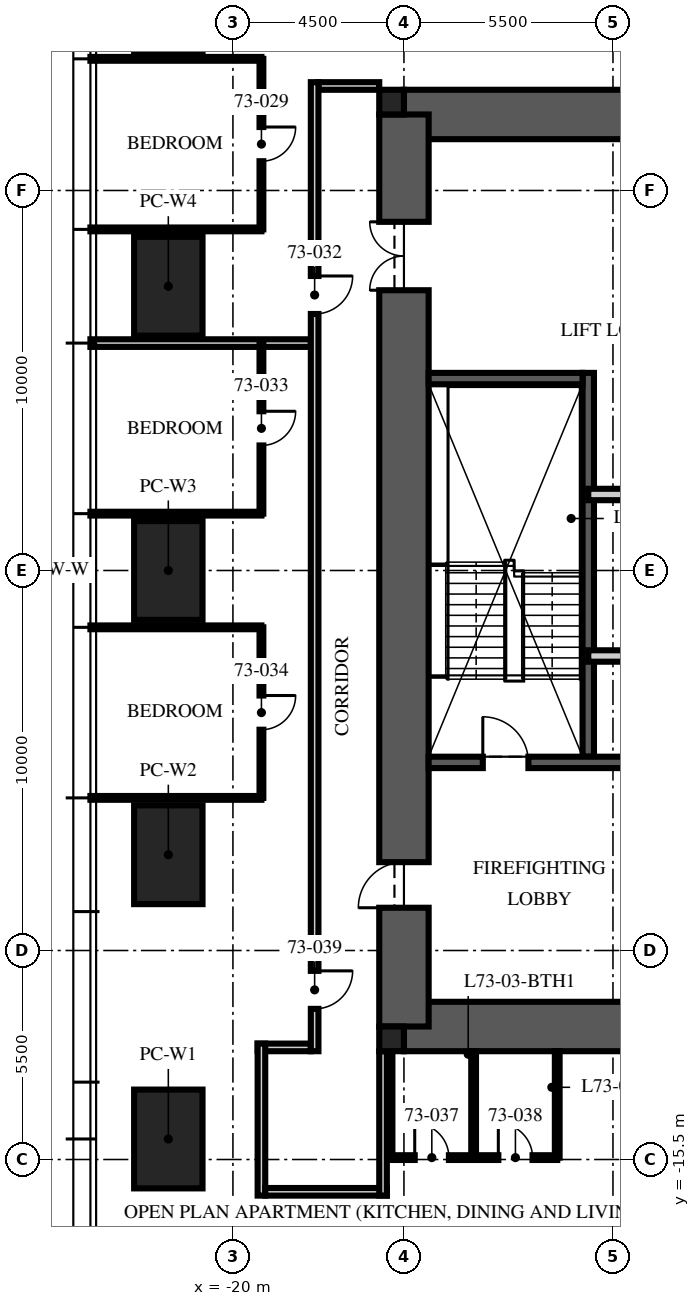
"""IFC4 building model, lengths in metres.
Left out: names, types, materials, properties, quantities, classifications, styles, units other than length and angle.
Written with IfcOpenShell. Run it as: python <this file> out.ifc"""

import sys

from ifc_helpers import new_model, si_unit, direction, frame, frame_2d, origin, origin_2d, place, context, subcontext, project, spatial, rectangle, extrude, element, fill, save


model = new_model("IFC4")
c1 = context("Model", 3, precision=1e-05, world=origin(), true_north=direction((0.0, 1.0)))
c2 = subcontext(c1, "Body", "Model", "MODEL_VIEW")
j1 = project(units=[si_unit("LENGTHUNIT", "METRE"), si_unit("PLANEANGLEUNIT", "RADIAN")], contexts=[c1])
p1 = place(None, origin())
s1 = spatial("IfcSite", under=j1, at=p1, CompositionType="ELEMENT")
p2 = place(p1, origin())
s2 = spatial("IfcBuilding", under=s1, at=p2, CompositionType="ELEMENT")
p3 = place(p2, frame((0.0, 0.0, 293.25)))
s3 = spatial("IfcBuildingStorey", under=s2, at=p3, CompositionType="ELEMENT", Elevation=293.25)
for number, where, z_axis, x_axis in (
    (1, (-15.5, 12.0, -0.25), (0.0, 0.0, 1.0), (1.0, 0.0, 0.0)),
    (2, (-15.5, -12.0, -0.25), (0.0, 0.0, 1.0), (1.0, 0.0, 0.0)),
):
    element("IfcWall", number, at=place(p3, frame(where, z_axis=z_axis, x_axis=x_axis)), inside=s3, PredefinedType="SHEAR", context=c2, shape_type="SweptSolid", body=[
        extrude(rectangle(XDim=31.0, YDim=1.3, at=frame_2d((15.5, 0.0))), origin(), (0.0, 0.0, 1.0), 3.75),
    ])
p4 = place(p3, frame((-15.5, -12.0, -0.25), z_axis=(0.0, 0.0, 1.0), x_axis=(0.0, 1.0, 0.0)))
e3 = element("IfcWall", 3, at=p4, inside=s3, PredefinedType="SHEAR", context=c2, shape_type="SweptSolid", body=[
    extrude(rectangle(XDim=24.0, YDim=1.3, at=frame_2d((12.0, 0.0))), origin(), (0.0, 0.0, 1.0), 3.75),
])
p5 = place(p4, frame((3.125, 0.0, 0.25)))
e4 = element("IfcOpeningElement", 4, at=p5, cuts=e3, PredefinedType="OPENING", context=c2, shape_type="SweptSolid", body=[
    extrude(rectangle(XDim=1.2, YDim=2.1, at=frame_2d((0.6, 1.05))), frame((0.0, 0.66, 0.0), z_axis=(0.0, -1.0, 0.0), x_axis=(1.0, 0.0, 0.0)), (0.0, 0.0, 1.0), 1.32),
])
p6 = place(p4, frame((19.375, 0.0, 0.25)))
e5 = element("IfcOpeningElement", 5, at=p6, cuts=e3, PredefinedType="OPENING", context=c2, shape_type="SweptSolid", body=[
    extrude(rectangle(XDim=1.8, YDim=2.1, at=frame_2d((0.9, 1.05))), frame((0.0, 0.66, 0.0), z_axis=(0.0, -1.0, 0.0), x_axis=(1.0, 0.0, 0.0)), (0.0, 0.0, 1.0), 1.32),
])
for number, where, z_axis, x_axis in (
    (6, (-15.825, 12.325, -0.25), (0.0, 0.0, 1.0), (1.0, 0.0, 0.0)),
    (7, (-15.825, -12.325, -0.25), (0.0, 0.0, 1.0), (1.0, 0.0, 0.0)),
):
    element("IfcColumn", number, at=place(p3, frame(where, z_axis=z_axis, x_axis=x_axis)), inside=s3, PredefinedType="COLUMN", context=c2, shape_type="SweptSolid", body=[
        extrude(rectangle(XDim=0.65, YDim=0.65, at=origin_2d()), origin(), (0.0, 0.0, 1.0), 3.75),
    ])
for number, where, z_axis, x_axis in (
    (8, (-21.7, -14.96, 0.0), (0.0, 0.0, 1.0), (0.0, 1.0, 0.0)),
    (9, (-21.7, -7.48, 0.0), (0.0, 0.0, 1.0), (0.0, 1.0, 0.0)),
    (10, (-21.7, 0.0, 0.0), (0.0, 0.0, 1.0), (0.0, 1.0, 0.0)),
    (11, (-21.7, 7.48, 0.0), (0.0, 0.0, 1.0), (0.0, 1.0, 0.0)),
):
    element("IfcColumn", number, at=place(p3, frame(where, z_axis=z_axis, x_axis=x_axis)), inside=s3, PredefinedType="COLUMN", context=c2, shape_type="SweptSolid", body=[
        extrude(rectangle(XDim=2.6, YDim=1.8, at=origin_2d()), origin(), (0.0, 0.0, 1.0), 3.75),
    ])
p7 = place(p3, frame((-10.65, -4.9, 0.0), z_axis=(0.0, 0.0, 1.0), x_axis=(0.0, 1.0, 0.0)))
e12 = element("IfcWall", 12, at=p7, inside=s3, PredefinedType="SOLIDWALL", context=c2, shape_type="SweptSolid", body=[
    extrude(rectangle(XDim=10.1, YDim=0.3, at=frame_2d((5.05, 0.0))), origin(), (0.0, 0.0, 1.0), 3.5),
])
p8 = place(p3, frame((-14.85, -5.05, 0.0), z_axis=(0.0, 0.0, 1.0), x_axis=(1.0, 0.0, 0.0)))
e13 = element("IfcWall", 13, at=p8, inside=s3, PredefinedType="SOLIDWALL", context=c2, shape_type="SweptSolid", body=[
    extrude(rectangle(XDim=6.05, YDim=0.3, at=frame_2d((3.025, 0.0))), origin(), (0.0, 0.0, 1.0), 3.5),
])
p9 = place(p8, frame((1.425, 0.0, 0.0)))
e14 = element("IfcOpeningElement", 14, at=p9, cuts=e13, PredefinedType="OPENING", context=c2, shape_type="SweptSolid", body=[
    extrude(rectangle(XDim=1.2, YDim=2.1, at=frame_2d((0.6, 1.05))), frame((0.0, 0.16, 0.0), z_axis=(0.0, -1.0, 0.0), x_axis=(1.0, 0.0, 0.0)), (0.0, 0.0, 1.0), 0.32),
])
p10 = place(p3, frame((-14.85, 5.05, 0.0), z_axis=(0.0, 0.0, 1.0), x_axis=(1.0, 0.0, 0.0)))
e15 = element("IfcWall", 15, at=p10, inside=s3, PredefinedType="SOLIDWALL", context=c2, shape_type="SweptSolid", body=[
    extrude(rectangle(XDim=4.05, YDim=0.3, at=frame_2d((2.025, 0.0))), origin(), (0.0, 0.0, 1.0), 3.5),
])
p11 = place(p3, frame((-10.65, 2.0, 0.0), z_axis=(0.0, 0.0, 1.0), x_axis=(1.0, 0.0, 0.0)))
e16 = element("IfcWall", 16, at=p11, inside=s3, PredefinedType="PARTITIONING", context=c2, shape_type="SweptSolid", body=[
    extrude(rectangle(XDim=21.3, YDim=0.3, at=frame_2d((10.65, 0.0))), origin(), (0.0, 0.0, 1.0), 3.5),
])
p12 = place(p11, frame((10.05, 0.0, 0.0)))
e17 = element("IfcOpeningElement", 17, at=p12, cuts=e16, PredefinedType="OPENING", context=c2, shape_type="SweptSolid", body=[
    extrude(rectangle(XDim=1.2, YDim=2.1, at=frame_2d((0.6, 1.05))), frame((0.0, 0.16, 0.0), z_axis=(0.0, -1.0, 0.0), x_axis=(1.0, 0.0, 0.0)), (0.0, 0.0, 1.0), 0.32),
])
p13 = place(p11, frame((18.942, 0.0, 0.0)))
e18 = element("IfcOpeningElement", 18, at=p13, cuts=e16, PredefinedType="OPENING", context=c2, shape_type="SweptSolid", body=[
    extrude(rectangle(XDim=0.9, YDim=2.1, at=frame_2d((0.45, 1.05))), frame((0.0, 0.16, 0.0), z_axis=(0.0, -1.0, 0.0), x_axis=(1.0, 0.0, 0.0)), (0.0, 0.0, 1.0), 0.32),
])
p14 = place(p3, frame((-10.65, -2.25, 0.0), z_axis=(0.0, 0.0, 1.0), x_axis=(1.0, 0.0, 0.0)))
e19 = element("IfcWall", 19, at=p14, inside=s3, PredefinedType="PARTITIONING", context=c2, shape_type="SweptSolid", body=[
    extrude(rectangle(XDim=7.35, YDim=0.3, at=frame_2d((3.675, 0.0))), origin(), (0.0, 0.0, 1.0), 3.5),
])
p15 = place(p3, frame((-17.95, -12.55, 0.0), z_axis=(0.0, 0.0, 1.0), x_axis=(-1.0, 0.0, 0.0)))
e20 = element("IfcWall", 20, at=p15, inside=s3, PredefinedType="PARTITIONING", context=c2, shape_type="SweptSolid", body=[
    extrude(rectangle(XDim=1.4, YDim=0.2, at=frame_2d((0.7, 0.0))), origin(), (0.0, 0.0, 1.0), 3.5),
])
p16 = place(p3, frame((-19.25, -12.45, 0.0), z_axis=(0.0, 0.0, 1.0), x_axis=(0.0, -1.0, 0.0)))
e21 = element("IfcWall", 21, at=p16, inside=s3, PredefinedType="PARTITIONING", context=c2, shape_type="SweptSolid", body=[
    extrude(rectangle(XDim=4.0, YDim=0.2, at=frame_2d((2.0, 0.0))), origin(), (0.0, 0.0, 1.0), 2.9),
])
p17 = place(p3, frame((-19.15, -16.35, 0.0), z_axis=(0.0, 0.0, 1.0), x_axis=(1.0, 0.0, 0.0)))
e22 = element("IfcWall", 22, at=p17, inside=s3, PredefinedType="PARTITIONING", context=c2, shape_type="SweptSolid", body=[
    extrude(rectangle(XDim=3.2, YDim=0.2, at=frame_2d((1.6, 0.0))), origin(), (0.0, 0.0, 1.0), 2.6),
])
p18 = place(p3, frame((-16.05, -16.45, 0.0), z_axis=(0.0, 0.0, 1.0), x_axis=(0.0, 1.0, 0.0)))
e23 = element("IfcWall", 23, at=p18, inside=s3, PredefinedType="PARTITIONING", context=c2, shape_type="SweptSolid", body=[
    extrude(rectangle(XDim=3.8, YDim=0.2, at=frame_2d((1.9, 0.0))), origin(), (0.0, 0.0, 1.0), 2.6),
])
p19 = place(p3, frame((-16.15, 12.75, 0.0), z_axis=(0.0, 0.0, 1.0), x_axis=(-1.0, 0.0, 0.0)))
e24 = element("IfcWall", 24, at=p19, inside=s3, PredefinedType="PARTITIONING", context=c2, shape_type="SweptSolid", body=[
    extrude(rectangle(XDim=1.6, YDim=0.2, at=frame_2d((0.8, 0.0))), origin(), (0.0, 0.0, 1.0), 2.6),
])
for number, where, z_axis, x_axis in (
    (25, (-19.25, 13.464, 0.0), (0.0, 0.0, 1.0), (-1.0, 0.0, 0.0)),
    (26, (-19.25, 8.976, 0.0), (0.0, 0.0, 1.0), (-1.0, 0.0, 0.0)),
):
    element("IfcWall", number, at=place(p3, frame(where, z_axis=z_axis, x_axis=x_axis)), inside=s3, PredefinedType="PARTITIONING", context=c2, shape_type="SweptSolid", body=[
        extrude(rectangle(XDim=4.5, YDim=0.1, at=frame_2d((2.25, 0.0))), origin(), (0.0, 0.0, 1.0), 3.01),
    ])
p20 = place(p3, frame((-17.95, 5.984, 0.0), z_axis=(0.0, 0.0, 1.0), x_axis=(-1.0, 0.0, 0.0)))
e27 = element("IfcWall", 27, at=p20, inside=s3, PredefinedType="PARTITIONING", context=c2, shape_type="SweptSolid", body=[
    extrude(rectangle(XDim=5.8, YDim=0.2, at=frame_2d((2.9, 0.0))), origin(), (0.0, 0.0, 1.0), 3.01),
])
for number, where, z_axis, x_axis in (
    (28, (-19.25, 1.496, 0.0), (0.0, 0.0, 1.0), (-1.0, 0.0, 0.0)),
    (29, (-19.25, -1.496, 0.0), (0.0, 0.0, 1.0), (-1.0, 0.0, 0.0)),
    (30, (-19.25, -5.984, 0.0), (0.0, 0.0, 1.0), (-1.0, 0.0, 0.0)),
):
    element("IfcWall", number, at=place(p3, frame(where, z_axis=z_axis, x_axis=x_axis)), inside=s3, PredefinedType="PARTITIONING", context=c2, shape_type="SweptSolid", body=[
        extrude(rectangle(XDim=4.5, YDim=0.1, at=frame_2d((2.25, 0.0))), origin(), (0.0, 0.0, 1.0), 3.01),
    ])
p21 = place(p3, frame((-19.25, 13.464, 0.0), z_axis=(0.0, 0.0, 1.0), x_axis=(0.0, -1.0, 0.0)))
e31 = element("IfcWall", 31, at=p21, inside=s3, PredefinedType="PARTITIONING", context=c2, shape_type="SweptSolid", body=[
    extrude(rectangle(XDim=4.488, YDim=0.1, at=frame_2d((2.244, 0.0))), origin(), (0.0, 0.0, 1.0), 2.91),
])
p22 = place(p21, frame((1.794, 0.0, 0.0)))
e32 = element("IfcOpeningElement", 32, at=p22, cuts=e31, PredefinedType="OPENING", context=c2, shape_type="SweptSolid", body=[
    extrude(rectangle(XDim=0.9, YDim=2.1, at=frame_2d((0.45, 1.05))), frame((0.0, 0.06, 0.0), z_axis=(0.0, -1.0, 0.0), x_axis=(1.0, 0.0, 0.0)), (0.0, 0.0, 1.0), 0.12),
])
p23 = place(p3, frame((-19.25, 5.984, 0.0), z_axis=(0.0, 0.0, 1.0), x_axis=(0.0, -1.0, 0.0)))
e33 = element("IfcWall", 33, at=p23, inside=s3, PredefinedType="PARTITIONING", context=c2, shape_type="SweptSolid", body=[
    extrude(rectangle(XDim=4.488, YDim=0.1, at=frame_2d((2.244, 0.0))), origin(), (0.0, 0.0, 1.0), 2.91),
])
p24 = place(p23, frame((1.794, 0.0, 0.0)))
e34 = element("IfcOpeningElement", 34, at=p24, cuts=e33, PredefinedType="OPENING", context=c2, shape_type="SweptSolid", body=[
    extrude(rectangle(XDim=0.9, YDim=2.1, at=frame_2d((0.45, 1.05))), frame((0.0, 0.06, 0.0), z_axis=(0.0, -1.0, 0.0), x_axis=(1.0, 0.0, 0.0)), (0.0, 0.0, 1.0), 0.12),
])
p25 = place(p3, frame((-19.25, -1.496, 0.0), z_axis=(0.0, 0.0, 1.0), x_axis=(0.0, -1.0, 0.0)))
e35 = element("IfcWall", 35, at=p25, inside=s3, PredefinedType="PARTITIONING", context=c2, shape_type="SweptSolid", body=[
    extrude(rectangle(XDim=4.488, YDim=0.1, at=frame_2d((2.244, 0.0))), origin(), (0.0, 0.0, 1.0), 2.91),
])
p26 = place(p25, frame((1.794, 0.0, 0.0)))
e36 = element("IfcOpeningElement", 36, at=p26, cuts=e35, PredefinedType="OPENING", context=c2, shape_type="SweptSolid", body=[
    extrude(rectangle(XDim=0.9, YDim=2.1, at=frame_2d((0.45, 1.05))), frame((0.0, 0.06, 0.0), z_axis=(0.0, -1.0, 0.0), x_axis=(1.0, 0.0, 0.0)), (0.0, 0.0, 1.0), 0.12),
])
p27 = place(p3, frame((-15.866, -15.45, 0.0), z_axis=(0.0, 0.0, 1.0), x_axis=(1.0, 0.0, 0.0)))
e37 = element("IfcWall", 37, at=p27, inside=s3, PredefinedType="PARTITIONING", context=c2, shape_type="SweptSolid", body=[
    extrude(rectangle(XDim=4.4, YDim=0.125, at=frame_2d((2.2, 0.0))), origin(), (0.0, 0.0, 1.0), 2.9),
])
p28 = place(p27, frame((0.65, 0.0, 0.0)))
e38 = element("IfcOpeningElement", 38, at=p28, cuts=e37, PredefinedType="OPENING", context=c2, shape_type="SweptSolid", body=[
    extrude(rectangle(XDim=0.9, YDim=2.1, at=frame_2d((0.45, 1.05))), frame((0.0, 0.073, 0.0), z_axis=(0.0, -1.0, 0.0), x_axis=(1.0, 0.0, 0.0)), (0.0, 0.0, 1.0), 0.145),
])
p29 = place(p27, frame((2.85, 0.0, 0.0)))
e39 = element("IfcOpeningElement", 39, at=p29, cuts=e37, PredefinedType="OPENING", context=c2, shape_type="SweptSolid", body=[
    extrude(rectangle(XDim=0.9, YDim=2.1, at=frame_2d((0.45, 1.05))), frame((0.0, 0.073, 0.0), z_axis=(0.0, -1.0, 0.0), x_axis=(1.0, 0.0, 0.0)), (0.0, 0.0, 1.0), 0.145),
])
p30 = place(p3, frame((-15.866, -12.65, 0.0), z_axis=(0.0, 0.0, 1.0), x_axis=(0.0, -1.0, 0.0)))
e40 = element("IfcWall", 40, at=p30, inside=s3, PredefinedType="PARTITIONING", context=c2, shape_type="SweptSolid", body=[
    extrude(rectangle(XDim=2.8, YDim=0.125, at=frame_2d((1.4, 0.0))), origin(), (0.0, 0.0, 1.0), 2.6),
])
for number, where, z_axis, x_axis in (
    (41, (-13.667, -12.65, 0.0), (0.0, 0.0, 1.0), (0.0, -1.0, 0.0)),
    (42, (-11.467, -12.65, 0.0), (0.0, 0.0, 1.0), (0.0, -1.0, 0.0)),
):
    element("IfcWall", number, at=place(p3, frame(where, z_axis=z_axis, x_axis=x_axis)), inside=s3, PredefinedType="PARTITIONING", context=c2, shape_type="SweptSolid", body=[
        extrude(rectangle(XDim=2.8, YDim=0.125, at=frame_2d((1.4, 0.0))), origin(), (0.0, 0.0, 1.0), 3.5),
    ])
p31 = place(p3, frame((-17.85, 12.85, 0.0), z_axis=(0.0, 0.0, 1.0), x_axis=(0.0, -1.0, 0.0)))
e43 = element("IfcWall", 43, at=p31, inside=s3, PredefinedType="PARTITIONING", context=c2, shape_type="SweptSolid", body=[
    extrude(rectangle(XDim=25.5, YDim=0.2, at=frame_2d((12.75, 0.0))), origin(), (0.0, 0.0, 1.0), 2.9),
])
p32 = place(p31, frame((5.1, 0.0, 0.0)))
e44 = element("IfcOpeningElement", 44, at=p32, cuts=e43, PredefinedType="OPENING", context=c2, shape_type="SweptSolid", body=[
    extrude(rectangle(XDim=1.0, YDim=2.2, at=frame_2d((0.5, 1.1))), frame((0.0, 0.11, 0.0), z_axis=(0.0, -1.0, 0.0), x_axis=(1.0, 0.0, 0.0)), (0.0, 0.0, 1.0), 0.22),
])
p33 = place(p31, frame((23.386, 0.0, 0.0)))
e45 = element("IfcOpeningElement", 45, at=p33, cuts=e43, PredefinedType="OPENING", context=c2, shape_type="SweptSolid", body=[
    extrude(rectangle(XDim=1.0, YDim=2.2, at=frame_2d((0.5, 1.1))), frame((0.0, 0.11, 0.0), z_axis=(0.0, -1.0, 0.0), x_axis=(1.0, 0.0, 0.0)), (0.0, 0.0, 1.0), 0.22),
])
p34 = place(p9, origin())
e46 = element("IfcDoor", 46, at=p34, inside=s3, OperationType="SINGLE_SWING_LEFT", PredefinedType="DOOR", context=c2, shape_type="SweptSolid", body=[
    extrude(rectangle(XDim=1.2, YDim=2.1, at=frame_2d((0.6, 1.05))), frame((0.0, 0.025, 0.0), z_axis=(0.0, -1.0, 0.0), x_axis=(1.0, 0.0, 0.0)), (0.0, 0.0, 1.0), 0.05),
])
fill(e14, e46)
p35 = place(p5, origin())
e47 = element("IfcDoor", 47, at=p35, inside=s3, OperationType="SINGLE_SWING_LEFT", PredefinedType="DOOR", context=c2, shape_type="SweptSolid", body=[
    extrude(rectangle(XDim=1.2, YDim=2.1, at=frame_2d((0.6, 1.05))), frame((0.0, 0.025, 0.0), z_axis=(0.0, -1.0, 0.0), x_axis=(1.0, 0.0, 0.0)), (0.0, 0.0, 1.0), 0.05),
])
fill(e4, e47)
p36 = place(p6, origin())
e48 = element("IfcDoor", 48, at=p36, inside=s3, OperationType="DOUBLE_DOOR_SINGLE_SWING", PredefinedType="DOOR", context=c2, shape_type="SweptSolid", body=[
    extrude(rectangle(XDim=1.8, YDim=2.1, at=frame_2d((0.9, 1.05))), frame((0.0, 0.025, 0.0), z_axis=(0.0, -1.0, 0.0), x_axis=(1.0, 0.0, 0.0)), (0.0, 0.0, 1.0), 0.05),
])
fill(e5, e48)
p37 = place(p22, origin())
e49 = element("IfcDoor", 49, at=p37, inside=s3, OperationType="SINGLE_SWING_LEFT", PredefinedType="DOOR", context=c2, shape_type="SweptSolid", body=[
    extrude(rectangle(XDim=0.9, YDim=2.1, at=frame_2d((0.45, 1.05))), frame((0.0, 0.025, 0.0), z_axis=(0.0, -1.0, 0.0), x_axis=(1.0, 0.0, 0.0)), (0.0, 0.0, 1.0), 0.05),
])
fill(e32, e49)
p38 = place(p32, origin())
e50 = element("IfcDoor", 50, at=p38, inside=s3, OperationType="SINGLE_SWING_LEFT", PredefinedType="DOOR", context=c2, shape_type="SweptSolid", body=[
    extrude(rectangle(XDim=1.0, YDim=2.2, at=frame_2d((0.5, 1.1))), frame((0.0, 0.025, 0.0), z_axis=(0.0, -1.0, 0.0), x_axis=(1.0, 0.0, 0.0)), (0.0, 0.0, 1.0), 0.05),
])
fill(e44, e50)
p39 = place(p24, origin())
e51 = element("IfcDoor", 51, at=p39, inside=s3, OperationType="SINGLE_SWING_LEFT", PredefinedType="DOOR", context=c2, shape_type="SweptSolid", body=[
    extrude(rectangle(XDim=0.9, YDim=2.1, at=frame_2d((0.45, 1.05))), frame((0.0, 0.025, 0.0), z_axis=(0.0, -1.0, 0.0), x_axis=(1.0, 0.0, 0.0)), (0.0, 0.0, 1.0), 0.05),
])
fill(e34, e51)
p40 = place(p26, origin())
e52 = element("IfcDoor", 52, at=p40, inside=s3, OperationType="SINGLE_SWING_LEFT", PredefinedType="DOOR", context=c2, shape_type="SweptSolid", body=[
    extrude(rectangle(XDim=0.9, YDim=2.1, at=frame_2d((0.45, 1.05))), frame((0.0, 0.025, 0.0), z_axis=(0.0, -1.0, 0.0), x_axis=(1.0, 0.0, 0.0)), (0.0, 0.0, 1.0), 0.05),
])
fill(e36, e52)
p41 = place(p28, origin())
e53 = element("IfcDoor", 53, at=p41, inside=s3, OperationType="SINGLE_SWING_LEFT", PredefinedType="DOOR", context=c2, shape_type="SweptSolid", body=[
    extrude(rectangle(XDim=0.9, YDim=2.1, at=frame_2d((0.45, 1.05))), frame((0.0, 0.025, 0.0), z_axis=(0.0, -1.0, 0.0), x_axis=(1.0, 0.0, 0.0)), (0.0, 0.0, 1.0), 0.05),
])
fill(e38, e53)
p42 = place(p29, origin())
e54 = element("IfcDoor", 54, at=p42, inside=s3, OperationType="SINGLE_SWING_LEFT", PredefinedType="DOOR", context=c2, shape_type="SweptSolid", body=[
    extrude(rectangle(XDim=0.9, YDim=2.1, at=frame_2d((0.45, 1.05))), frame((0.0, 0.025, 0.0), z_axis=(0.0, -1.0, 0.0), x_axis=(1.0, 0.0, 0.0)), (0.0, 0.0, 1.0), 0.05),
])
fill(e39, e54)
p43 = place(p33, origin())
e55 = element("IfcDoor", 55, at=p43, inside=s3, OperationType="SINGLE_SWING_LEFT", PredefinedType="DOOR", context=c2, shape_type="SweptSolid", body=[
    extrude(rectangle(XDim=1.0, YDim=2.2, at=frame_2d((0.5, 1.1))), frame((0.0, 0.025, 0.0), z_axis=(0.0, -1.0, 0.0), x_axis=(1.0, 0.0, 0.0)), (0.0, 0.0, 1.0), 0.05),
])
fill(e45, e55)
save(model, sys.argv[1])
